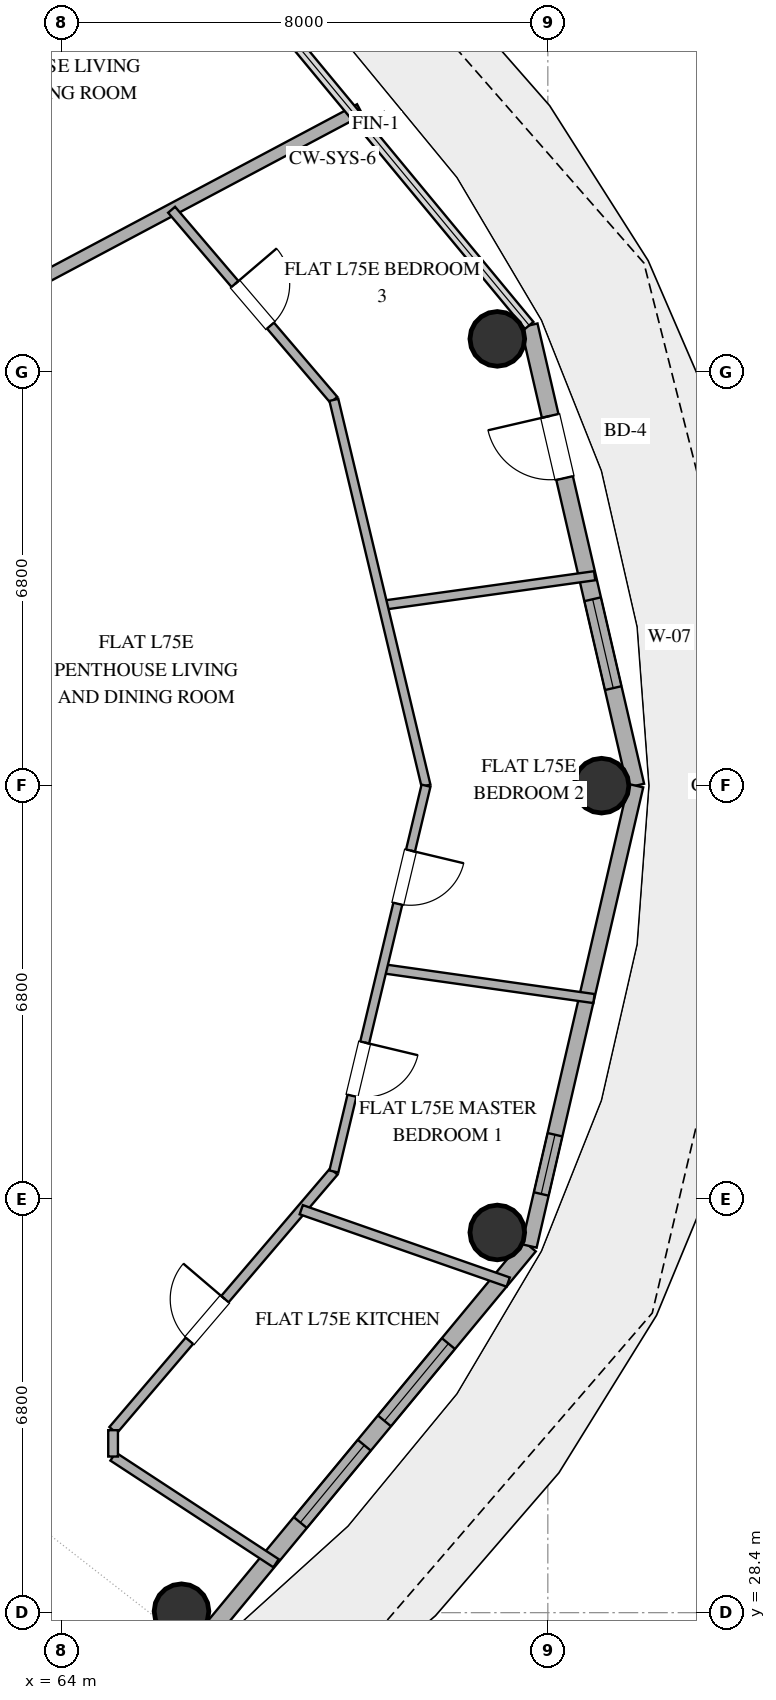
"""IFC4 building model, lengths in metres.
Left out: names, types, materials, properties, quantities, classifications, styles, units other than length and angle.
Written with IfcOpenShell. Run it as: python <this file> out.ifc"""

import sys

from ifc_helpers import new_model, si_unit, direction, frame, frame_2d, origin, origin_2d, place, context, subcontext, project, spatial, rectangle, hollow_circle, extrude, element, fill, save


model = new_model("IFC4")
c1 = context("Model", 3, precision=1e-05, world=origin(), true_north=direction((0.0, 1.0)))
c2 = subcontext(c1, "Body", "Model", "MODEL_VIEW")
j1 = project(units=[si_unit("LENGTHUNIT", "METRE"), si_unit("PLANEANGLEUNIT", "RADIAN")], contexts=[c1])
p1 = place(None, origin())
s1 = spatial("IfcSite", under=j1, at=p1, CompositionType="ELEMENT")
p2 = place(p1, origin())
s2 = spatial("IfcBuilding", under=s1, at=p2, CompositionType="ELEMENT")
p3 = place(p2, frame((0.0, 0.0, 291.0)))
s3 = spatial("IfcBuildingStorey", under=s2, at=p3, CompositionType="ELEMENT", Elevation=291.0)
for number, where, z_axis, x_axis in (
    (1, (72.883, 42.0, 0.0), (0.0, 0.0, 1.0), (1.0, 0.0, 0.0)),
    (2, (71.169, 49.347, 0.0), (0.0, 0.0, 1.0), (1.0, 0.0, 0.0)),
    (3, (65.975, 28.424, 0.0), (0.0, 0.0, 1.0), (1.0, 0.0, 0.0)),
    (4, (71.169, 34.653, 0.0), (0.0, 0.0, 1.0), (1.0, 0.0, 0.0)),
):
    element("IfcColumn", number, at=place(p3, frame(where, z_axis=z_axis, x_axis=x_axis)), inside=s3, PredefinedType="COLUMN", context=c2, shape_type="SweptSolid", body=[
        extrude(hollow_circle(Radius=0.45, WallThickness=0.025, at=origin_2d()), origin(), (0.0, 0.0, 1.0), 3.37),
    ])
p4 = place(p3, frame((73.447, 42.0, 0.0), z_axis=(0.0, 0.0, 1.0), x_axis=(-0.225635078214, 0.974211892495, 0.0)))
e5 = element("IfcWall", 5, at=p4, inside=s3, PredefinedType="SOLIDWALL", context=c2, shape_type="SweptSolid", body=[
    extrude(rectangle(XDim=7.77, YDim=0.28, at=frame_2d((3.885, 0.0))), origin(), (0.0, 0.0, 1.0), 3.37),
])
p5 = place(p4, frame((1.647, 0.0, 0.85)))
e6 = element("IfcOpeningElement", 6, at=p5, cuts=e5, PredefinedType="OPENING", context=c2, shape_type="SweptSolid", body=[
    extrude(rectangle(XDim=1.5, YDim=1.8, at=frame_2d((0.75, 0.9))), frame((0.0, 0.15, 0.0), z_axis=(0.0, -1.0, 0.0), x_axis=(1.0, 0.0, 0.0)), (0.0, 0.0, 1.0), 0.3),
])
p6 = place(p4, frame((5.192, 0.0, 0.0)))
e7 = element("IfcOpeningElement", 7, at=p6, cuts=e5, PredefinedType="OPENING", context=c2, shape_type="SweptSolid", body=[
    extrude(rectangle(XDim=1.05, YDim=2.2, at=frame_2d((0.525, 1.1))), frame((0.0, 0.15, 0.0), z_axis=(0.0, -1.0, 0.0), x_axis=(1.0, 0.0, 0.0)), (0.0, 0.0, 1.0), 0.3),
])
p7 = place(p3, frame((66.383, 28.013, 0.0), z_axis=(0.0, 0.0, 1.0), x_axis=(0.63761509934, 0.770355103243, 0.0)))
e8 = element("IfcWall", 8, at=p7, inside=s3, PredefinedType="SOLIDWALL", context=c2, shape_type="SweptSolid", body=[
    extrude(rectangle(XDim=8.33, YDim=0.28, at=frame_2d((4.165, 0.0))), origin(), (0.0, 0.0, 1.0), 3.37),
])
p8 = place(p7, frame((2.426, 0.0, 0.85)))
e9 = element("IfcOpeningElement", 9, at=p8, cuts=e8, PredefinedType="OPENING", context=c2, shape_type="SweptSolid", body=[
    extrude(rectangle(XDim=1.65, YDim=2.0, at=frame_2d((0.825, 1.0))), frame((0.0, 0.15, 0.0), z_axis=(0.0, -1.0, 0.0), x_axis=(1.0, 0.0, 0.0)), (0.0, 0.0, 1.0), 0.3),
])
p9 = place(p7, frame((4.596, 0.0, 0.85)))
e10 = element("IfcOpeningElement", 10, at=p9, cuts=e8, PredefinedType="OPENING", context=c2, shape_type="SweptSolid", body=[
    extrude(rectangle(XDim=1.65, YDim=2.0, at=frame_2d((0.825, 1.0))), frame((0.0, 0.15, 0.0), z_axis=(0.0, -1.0, 0.0), x_axis=(1.0, 0.0, 0.0)), (0.0, 0.0, 1.0), 0.3),
])
p10 = place(p3, frame((71.694, 34.43, 0.0), z_axis=(0.0, 0.0, 1.0), x_axis=(0.225635078214, 0.974211892495, 0.0)))
e11 = element("IfcWall", 11, at=p10, inside=s3, PredefinedType="SOLIDWALL", context=c2, shape_type="SweptSolid", body=[
    extrude(rectangle(XDim=7.77, YDim=0.25, at=frame_2d((3.885, 0.0))), origin(), (0.0, 0.0, 1.0), 3.37),
])
p11 = place(p10, frame((0.878, 0.0, 0.35)))
e12 = element("IfcOpeningElement", 12, at=p11, cuts=e11, PredefinedType="OPENING", context=c2, shape_type="SweptSolid", body=[
    extrude(rectangle(XDim=1.0, YDim=1.05, at=frame_2d((0.5, 0.525))), frame((0.0, 0.135, 0.0), z_axis=(0.0, -1.0, 0.0), x_axis=(1.0, 0.0, 0.0)), (0.0, 0.0, 1.0), 0.27),
])
p12 = place(p3, frame((68.909, 53.118, 0.0), z_axis=(0.0, 0.0, 1.0), x_axis=(-0.882939716422, -0.469486375909, 0.0)))
e13 = element("IfcWall", 13, at=p12, inside=s3, PredefinedType="PARTITIONING", context=c2, shape_type="SweptSolid", body=[
    extrude(rectangle(XDim=8.732, YDim=0.2, at=frame_2d((4.366, 0.0))), origin(), (0.0, 0.0, 1.0), 2.73),
])
p13 = place(p3, frame((64.85, 31.401, 0.0), z_axis=(0.0, 0.0, 1.0), x_axis=(0.649208179997, 0.760610767097, 0.0)))
e14 = element("IfcWall", 14, at=p13, inside=s3, PredefinedType="PLUMBINGWALL", context=c2, shape_type="SweptSolid", body=[
    extrude(rectangle(XDim=5.593, YDim=0.16, at=frame_2d((2.796, 0.0))), origin(), (0.0, 0.0, 1.0), 2.73),
])
p14 = place(p13, frame((1.933, 0.0, 0.0)))
e15 = element("IfcOpeningElement", 15, at=p14, cuts=e14, PredefinedType="OPENING", context=c2, shape_type="SweptSolid", body=[
    extrude(rectangle(XDim=0.9, YDim=2.1, at=frame_2d((0.45, 1.05))), frame((0.0, 0.09, 0.0), z_axis=(0.0, -1.0, 0.0), x_axis=(1.0, 0.0, 0.0)), (0.0, 0.0, 1.0), 0.18),
])
p15 = place(p3, frame((65.812, 51.471, 0.0), z_axis=(0.0, 0.0, 1.0), x_axis=(0.649224667474, -0.760596694145, 0.0)))
e16 = element("IfcWall", 16, at=p15, inside=s3, PredefinedType="PARTITIONING", context=c2, shape_type="SweptSolid", body=[
    extrude(rectangle(XDim=4.11, YDim=0.15, at=frame_2d((2.055, 0.0))), origin(), (0.0, 0.0, 1.0), 2.73),
])
p16 = place(p15, frame((1.605, 0.0, 0.0)))
e17 = element("IfcOpeningElement", 17, at=p16, cuts=e16, PredefinedType="OPENING", context=c2, shape_type="SweptSolid", body=[
    extrude(rectangle(XDim=0.9, YDim=2.1, at=frame_2d((0.45, 1.05))), frame((0.0, 0.085, 0.0), z_axis=(0.0, -1.0, 0.0), x_axis=(1.0, 0.0, 0.0)), (0.0, 0.0, 1.0), 0.17),
])
p17 = place(p3, frame((71.348, 33.837, 0.0), z_axis=(0.0, 0.0, 1.0), x_axis=(-0.943978629209, 0.330006587202, 0.0)))
e18 = element("IfcWall", 18, at=p17, inside=s3, PredefinedType="PLUMBINGWALL", context=c2, shape_type="SweptSolid", body=[
    extrude(rectangle(XDim=3.606, YDim=0.16, at=frame_2d((1.803, 0.0))), origin(), (0.0, 0.0, 1.0), 2.73),
])
p18 = place(p3, frame((69.288, 44.967, 0.0), z_axis=(0.0, 0.0, 1.0), x_axis=(0.990426984163, 0.138037636323, 0.0)))
e19 = element("IfcWall", 19, at=p18, inside=s3, PredefinedType="PARTITIONING", context=c2, shape_type="SweptSolid", body=[
    extrude(rectangle(XDim=3.516, YDim=0.15, at=frame_2d((1.758, 0.0))), origin(), (0.0, 0.0, 1.0), 2.73),
])
p19 = place(p3, frame((72.759, 38.499, 0.0), z_axis=(0.0, 0.0, 1.0), x_axis=(-0.990152617328, 0.139992122627, 0.0)))
e20 = element("IfcWall", 20, at=p19, inside=s3, PredefinedType="PARTITIONING", context=c2, shape_type="SweptSolid", body=[
    extrude(rectangle(XDim=3.516, YDim=0.15, at=frame_2d((1.758, 0.0))), origin(), (0.0, 0.0, 1.0), 2.73),
])
p20 = place(p3, frame((68.481, 48.345, 0.0), z_axis=(0.0, 0.0, 1.0), x_axis=(0.232298462197, -0.972644551962, 0.0)))
e21 = element("IfcWall", 21, at=p20, inside=s3, PredefinedType="PARTITIONING", context=c2, shape_type="SweptSolid", body=[
    extrude(rectangle(XDim=6.523, YDim=0.15, at=frame_2d((3.262, 0.0))), origin(), (0.0, 0.0, 1.0), 2.73),
])
p21 = place(p3, frame((69.996, 42.0, 0.0), z_axis=(0.0, 0.0, 1.0), x_axis=(-0.232298462197, -0.972644551962, 0.0)))
e22 = element("IfcWall", 22, at=p21, inside=s3, PredefinedType="PARTITIONING", context=c2, shape_type="SweptSolid", body=[
    extrude(rectangle(XDim=6.523, YDim=0.15, at=frame_2d((3.262, 0.0))), origin(), (0.0, 0.0, 1.0), 2.73),
])
p22 = place(p21, frame((4.342, 0.0, 0.0)))
e23 = element("IfcOpeningElement", 23, at=p22, cuts=e22, PredefinedType="OPENING", context=c2, shape_type="SweptSolid", body=[
    extrude(rectangle(XDim=0.9, YDim=2.1, at=frame_2d((0.45, 1.05))), frame((0.0, 0.085, 0.0), z_axis=(0.0, -1.0, 0.0), x_axis=(1.0, 0.0, 0.0)), (0.0, 0.0, 1.0), 0.17),
])
p23 = place(p21, frame((1.097, 0.0, 0.0)))
e24 = element("IfcOpeningElement", 24, at=p23, cuts=e22, PredefinedType="OPENING", context=c2, shape_type="SweptSolid", body=[
    extrude(rectangle(XDim=0.9, YDim=2.1, at=frame_2d((0.45, 1.05))), frame((0.0, 0.085, 0.0), z_axis=(0.0, -1.0, 0.0), x_axis=(1.0, 0.0, 0.0)), (0.0, 0.0, 1.0), 0.17),
])
p24 = place(p3, frame((67.53, 29.213, 0.0), z_axis=(0.0, 0.0, 1.0), x_axis=(-0.836629755679, 0.547768794212, 0.0)))
e25 = element("IfcWall", 25, at=p24, inside=s3, PredefinedType="PLUMBINGWALL", context=c2, shape_type="SweptSolid", body=[
    extrude(rectangle(XDim=3.203, YDim=0.16, at=frame_2d((1.602, 0.0))), origin(), (0.0, 0.0, 1.0), 2.73),
])
p25 = place(p3, frame((64.85, 30.968, 0.0), z_axis=(0.0, 0.0, 1.0), x_axis=(0.0, 1.0, 0.0)))
e26 = element("IfcWall", 26, at=p25, inside=s3, PredefinedType="PLUMBINGWALL", context=c2, shape_type="SweptSolid", body=[
    extrude(rectangle(XDim=0.434, YDim=0.16, at=frame_2d((0.217, 0.0))), origin(), (0.0, 0.0, 1.0), 2.73),
])
p26 = place(p5, origin())
e27 = element("IfcWindow", 27, at=p26, inside=s3, PartitioningType="SINGLE_PANEL", PredefinedType="WINDOW", context=c2, shape_type="SweptSolid", body=[
    extrude(rectangle(XDim=1.5, YDim=1.8, at=frame_2d((0.75, 0.9))), frame((0.0, 0.03, 0.0), z_axis=(0.0, -1.0, 0.0), x_axis=(1.0, 0.0, 0.0)), (0.0, 0.0, 1.0), 0.06),
])
fill(e6, e27)
p27 = place(p6, origin())
e28 = element("IfcDoor", 28, at=p27, inside=s3, OperationType="SINGLE_SWING_RIGHT", PredefinedType="DOOR", context=c2, shape_type="SweptSolid", body=[
    extrude(rectangle(XDim=1.05, YDim=2.2, at=frame_2d((0.525, 1.1))), frame((0.0, 0.025, 0.0), z_axis=(0.0, -1.0, 0.0), x_axis=(1.0, 0.0, 0.0)), (0.0, 0.0, 1.0), 0.05),
])
fill(e7, e28)
p28 = place(p8, origin())
e29 = element("IfcWindow", 29, at=p28, inside=s3, PartitioningType="SINGLE_PANEL", PredefinedType="WINDOW", context=c2, shape_type="SweptSolid", body=[
    extrude(rectangle(XDim=1.65, YDim=2.0, at=frame_2d((0.825, 1.0))), frame((0.0, 0.03, 0.0), z_axis=(0.0, -1.0, 0.0), x_axis=(1.0, 0.0, 0.0)), (0.0, 0.0, 1.0), 0.06),
])
fill(e9, e29)
p29 = place(p9, origin())
e30 = element("IfcWindow", 30, at=p29, inside=s3, PartitioningType="SINGLE_PANEL", PredefinedType="WINDOW", context=c2, shape_type="SweptSolid", body=[
    extrude(rectangle(XDim=1.65, YDim=2.0, at=frame_2d((0.825, 1.0))), frame((0.0, 0.03, 0.0), z_axis=(0.0, -1.0, 0.0), x_axis=(1.0, 0.0, 0.0)), (0.0, 0.0, 1.0), 0.06),
])
fill(e10, e30)
p30 = place(p11, origin())
e31 = element("IfcWindow", 31, at=p30, inside=s3, PartitioningType="SINGLE_PANEL", PredefinedType="WINDOW", context=c2, shape_type="SweptSolid", body=[
    extrude(rectangle(XDim=1.0, YDim=1.05, at=frame_2d((0.5, 0.525))), frame((0.0, 0.03, 0.0), z_axis=(0.0, -1.0, 0.0), x_axis=(1.0, 0.0, 0.0)), (0.0, 0.0, 1.0), 0.06),
])
fill(e12, e31)
p31 = place(p14, origin())
e32 = element("IfcDoor", 32, at=p31, inside=s3, OperationType="SINGLE_SWING_RIGHT", PredefinedType="DOOR", context=c2, shape_type="SweptSolid", body=[
    extrude(rectangle(XDim=0.9, YDim=2.1, at=frame_2d((0.45, 1.05))), frame((0.0, 0.025, 0.0), z_axis=(0.0, -1.0, 0.0), x_axis=(1.0, 0.0, 0.0)), (0.0, 0.0, 1.0), 0.05),
])
fill(e15, e32)
p32 = place(p16, origin())
e33 = element("IfcDoor", 33, at=p32, inside=s3, OperationType="SINGLE_SWING_LEFT", PredefinedType="DOOR", context=c2, shape_type="SweptSolid", body=[
    extrude(rectangle(XDim=0.9, YDim=2.1, at=frame_2d((0.45, 1.05))), frame((0.0, 0.025, 0.0), z_axis=(0.0, -1.0, 0.0), x_axis=(1.0, 0.0, 0.0)), (0.0, 0.0, 1.0), 0.05),
])
fill(e17, e33)
p33 = place(p22, origin())
e34 = element("IfcDoor", 34, at=p33, inside=s3, OperationType="SINGLE_SWING_LEFT", PredefinedType="DOOR", context=c2, shape_type="SweptSolid", body=[
    extrude(rectangle(XDim=0.9, YDim=2.1, at=frame_2d((0.45, 1.05))), frame((0.0, 0.025, 0.0), z_axis=(0.0, -1.0, 0.0), x_axis=(1.0, 0.0, 0.0)), (0.0, 0.0, 1.0), 0.05),
])
fill(e23, e34)
p34 = place(p23, origin())
e35 = element("IfcDoor", 35, at=p34, inside=s3, OperationType="SINGLE_SWING_LEFT", PredefinedType="DOOR", context=c2, shape_type="SweptSolid", body=[
    extrude(rectangle(XDim=0.9, YDim=2.1, at=frame_2d((0.45, 1.05))), frame((0.0, 0.025, 0.0), z_axis=(0.0, -1.0, 0.0), x_axis=(1.0, 0.0, 0.0)), (0.0, 0.0, 1.0), 0.05),
])
fill(e24, e35)
save(model, sys.argv[1])
